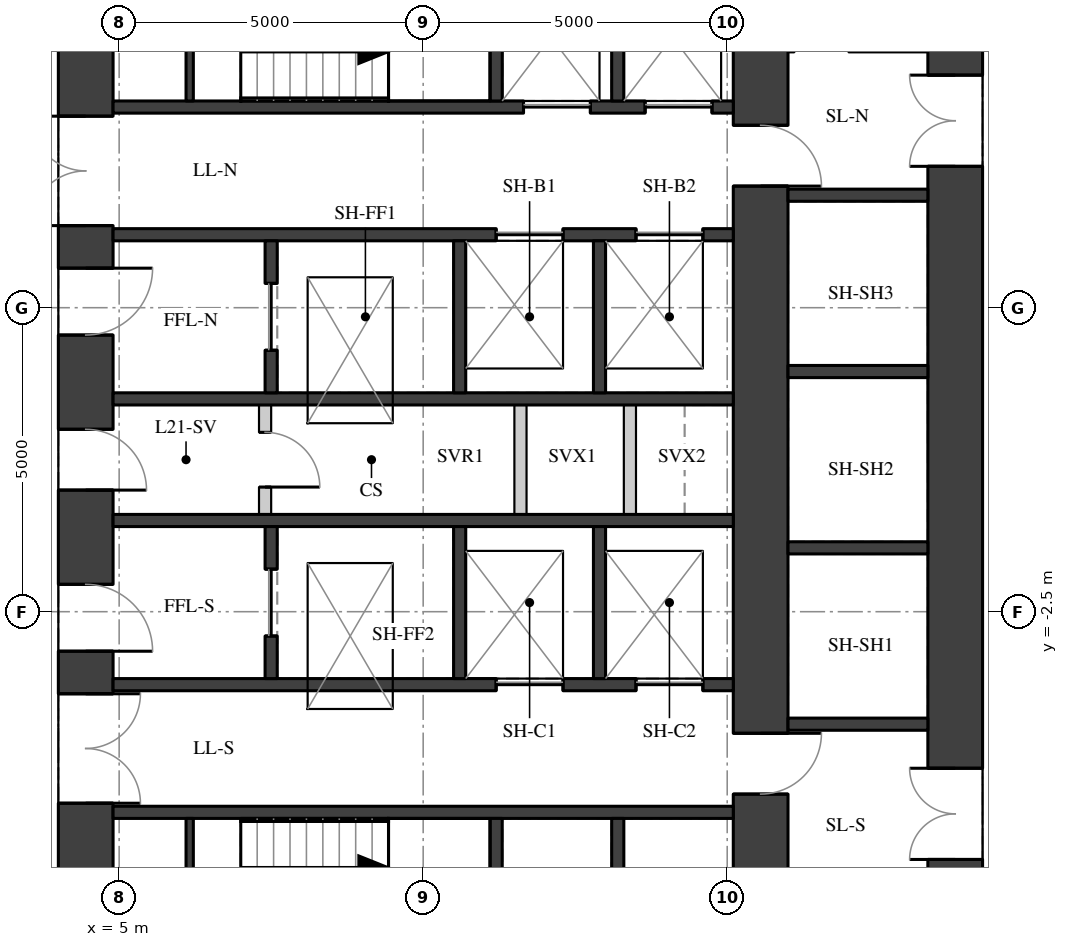
"""IFC4 building model, lengths in metres.
Left out: names, types, materials, properties, quantities, classifications, styles, units other than length and angle.
Written with IfcOpenShell. Run it as: python <this file> out.ifc"""

import sys

from ifc_helpers import new_model, si_unit, direction, frame, frame_2d, origin, place, context, subcontext, project, spatial, rectangle, extrude, element, fill, save


model = new_model("IFC4")
c1 = context("Model", 3, precision=1e-05, world=origin(), true_north=direction((0.0, 1.0)))
c2 = subcontext(c1, "Body", "Model", "MODEL_VIEW")
j1 = project(units=[si_unit("LENGTHUNIT", "METRE"), si_unit("PLANEANGLEUNIT", "RADIAN")], contexts=[c1])
p1 = place(None, origin())
s1 = spatial("IfcSite", under=j1, at=p1, CompositionType="ELEMENT")
p2 = place(p1, origin())
s2 = spatial("IfcBuilding", under=s1, at=p2, CompositionType="ELEMENT")
p3 = place(p2, frame((0.0, 0.0, 77.8)))
s3 = spatial("IfcBuildingStorey", under=s2, at=p3, CompositionType="ELEMENT", Elevation=77.8)
p4 = place(p3, frame((4.45, -11.1, 0.0), z_axis=(0.0, 0.0, 1.0), x_axis=(0.0, 1.0, 0.0)))
e1 = element("IfcWall", 1, at=p4, inside=s3, PredefinedType="SHEAR", context=c2, shape_type="SweptSolid", body=[
    extrude(rectangle(XDim=22.2, YDim=0.9, at=frame_2d((11.1, 0.0))), origin(), (0.0, 0.0, 1.0), 3.02),
])
p5 = place(p4, frame((2.35, 0.0, 0.0)))
e2 = element("IfcOpeningElement", 2, at=p5, cuts=e1, PredefinedType="OPENING", context=c2, shape_type="SweptSolid", body=[
    extrude(rectangle(XDim=1.5, YDim=2.1, at=frame_2d((0.75, 1.05))), frame((0.0, 0.46, 0.0), z_axis=(0.0, -1.0, 0.0), x_axis=(1.0, 0.0, 0.0)), (0.0, 0.0, 1.0), 0.92),
])
p6 = place(p4, frame((5.45, 0.0, 0.0)))
e3 = element("IfcOpeningElement", 3, at=p6, cuts=e1, PredefinedType="OPENING", context=c2, shape_type="SweptSolid", body=[
    extrude(rectangle(XDim=1.8, YDim=2.1, at=frame_2d((0.9, 1.05))), frame((0.0, 0.46, 0.0), z_axis=(0.0, -1.0, 0.0), x_axis=(1.0, 0.0, 0.0)), (0.0, 0.0, 1.0), 0.92),
])
p7 = place(p4, frame((7.95, 0.0, 0.0)))
e4 = element("IfcOpeningElement", 4, at=p7, cuts=e1, PredefinedType="OPENING", context=c2, shape_type="SweptSolid", body=[
    extrude(rectangle(XDim=1.1, YDim=2.1, at=frame_2d((0.55, 1.05))), frame((0.0, 0.46, 0.0), z_axis=(0.0, -1.0, 0.0), x_axis=(1.0, 0.0, 0.0)), (0.0, 0.0, 1.0), 0.92),
])
p8 = place(p4, frame((10.6, 0.0, 0.0)))
e5 = element("IfcOpeningElement", 5, at=p8, cuts=e1, PredefinedType="OPENING", context=c2, shape_type="SweptSolid", body=[
    extrude(rectangle(XDim=1.0, YDim=2.1, at=frame_2d((0.5, 1.05))), frame((0.0, 0.46, 0.0), z_axis=(0.0, -1.0, 0.0), x_axis=(1.0, 0.0, 0.0)), (0.0, 0.0, 1.0), 0.92),
])
p9 = place(p4, frame((13.15, 0.0, 0.0)))
e6 = element("IfcOpeningElement", 6, at=p9, cuts=e1, PredefinedType="OPENING", context=c2, shape_type="SweptSolid", body=[
    extrude(rectangle(XDim=1.1, YDim=2.1, at=frame_2d((0.55, 1.05))), frame((0.0, 0.46, 0.0), z_axis=(0.0, -1.0, 0.0), x_axis=(1.0, 0.0, 0.0)), (0.0, 0.0, 1.0), 0.92),
])
p10 = place(p4, frame((14.95, 0.0, 0.0)))
e7 = element("IfcOpeningElement", 7, at=p10, cuts=e1, PredefinedType="OPENING", context=c2, shape_type="SweptSolid", body=[
    extrude(rectangle(XDim=1.8, YDim=2.1, at=frame_2d((0.9, 1.05))), frame((0.0, 0.46, 0.0), z_axis=(0.0, -1.0, 0.0), x_axis=(1.0, 0.0, 0.0)), (0.0, 0.0, 1.0), 0.92),
])
p11 = place(p4, frame((18.35, 0.0, 0.0)))
e8 = element("IfcOpeningElement", 8, at=p11, cuts=e1, PredefinedType="OPENING", context=c2, shape_type="SweptSolid", body=[
    extrude(rectangle(XDim=1.5, YDim=2.1, at=frame_2d((0.75, 1.05))), frame((0.0, 0.46, 0.0), z_axis=(0.0, -1.0, 0.0), x_axis=(1.0, 0.0, 0.0)), (0.0, 0.0, 1.0), 0.92),
])
p12 = place(p3, frame((18.75, -11.1, 0.0), z_axis=(0.0, 0.0, 1.0), x_axis=(0.0, 1.0, 0.0)))
e9 = element("IfcWall", 9, at=p12, inside=s3, PredefinedType="SHEAR", context=c2, shape_type="SweptSolid", body=[
    extrude(rectangle(XDim=22.2, YDim=0.9, at=frame_2d((11.1, 0.0))), origin(), (0.0, 0.0, 1.0), 3.02),
])
p13 = place(p12, frame((15.925, 0.0, 0.0)))
e10 = element("IfcOpeningElement", 10, at=p13, cuts=e9, PredefinedType="OPENING", context=c2, shape_type="SweptSolid", body=[
    extrude(rectangle(XDim=1.5, YDim=2.1, at=frame_2d((0.75, 1.05))), frame((0.0, 0.46, 0.0), z_axis=(0.0, -1.0, 0.0), x_axis=(1.0, 0.0, 0.0)), (0.0, 0.0, 1.0), 0.92),
])
p14 = place(p12, frame((4.525, 0.0, 0.0)))
e11 = element("IfcOpeningElement", 11, at=p14, cuts=e9, PredefinedType="OPENING", context=c2, shape_type="SweptSolid", body=[
    extrude(rectangle(XDim=1.5, YDim=2.1, at=frame_2d((0.75, 1.05))), frame((0.0, 0.46, 0.0), z_axis=(0.0, -1.0, 0.0), x_axis=(1.0, 0.0, 0.0)), (0.0, 0.0, 1.0), 0.92),
])
p15 = place(p3, frame((15.55, -11.1, 0.0), z_axis=(0.0, 0.0, 1.0), x_axis=(0.0, 1.0, 0.0)))
e12 = element("IfcWall", 12, at=p15, inside=s3, PredefinedType="SHEAR", context=c2, shape_type="SweptSolid", body=[
    extrude(rectangle(XDim=22.2, YDim=0.9, at=frame_2d((11.1, 0.0))), origin(), (0.0, 0.0, 1.0), 3.02),
])
p16 = place(p15, frame((15.6, 0.0, 0.0)))
e13 = element("IfcOpeningElement", 13, at=p16, cuts=e12, PredefinedType="OPENING", context=c2, shape_type="SweptSolid", body=[
    extrude(rectangle(XDim=1.0, YDim=2.1, at=frame_2d((0.5, 1.05))), frame((0.0, 0.46, 0.0), z_axis=(0.0, -1.0, 0.0), x_axis=(1.0, 0.0, 0.0)), (0.0, 0.0, 1.0), 0.92),
])
p17 = place(p15, frame((5.6, 0.0, 0.0)))
e14 = element("IfcOpeningElement", 14, at=p17, cuts=e12, PredefinedType="OPENING", context=c2, shape_type="SweptSolid", body=[
    extrude(rectangle(XDim=1.0, YDim=2.1, at=frame_2d((0.5, 1.05))), frame((0.0, 0.46, 0.0), z_axis=(0.0, -1.0, 0.0), x_axis=(1.0, 0.0, 0.0)), (0.0, 0.0, 1.0), 0.92),
])
p18 = place(p3, frame((4.9, 5.8, 0.0), z_axis=(0.0, 0.0, 1.0), x_axis=(1.0, 0.0, 0.0)))
e15 = element("IfcWall", 15, at=p18, inside=s3, PredefinedType="SHEAR", context=c2, shape_type="SweptSolid", body=[
    extrude(rectangle(XDim=10.2, YDim=0.2, at=frame_2d((5.1, 0.0))), origin(), (0.0, 0.0, 1.0), 3.02),
])
p19 = place(p18, frame((6.75, 0.0, 0.0)))
e16 = element("IfcOpeningElement", 16, at=p19, cuts=e15, PredefinedType="OPENING", context=c2, shape_type="SweptSolid", body=[
    extrude(rectangle(XDim=1.1, YDim=2.1, at=frame_2d((0.55, 1.05))), frame((0.0, 0.11, 0.0), z_axis=(0.0, -1.0, 0.0), x_axis=(1.0, 0.0, 0.0)), (0.0, 0.0, 1.0), 0.22),
])
p20 = place(p18, frame((8.75, 0.0, 0.0)))
e17 = element("IfcOpeningElement", 17, at=p20, cuts=e15, PredefinedType="OPENING", context=c2, shape_type="SweptSolid", body=[
    extrude(rectangle(XDim=1.1, YDim=2.1, at=frame_2d((0.55, 1.05))), frame((0.0, 0.11, 0.0), z_axis=(0.0, -1.0, 0.0), x_axis=(1.0, 0.0, 0.0)), (0.0, 0.0, 1.0), 0.22),
])
p21 = place(p3, frame((4.9, 3.7, 0.0), z_axis=(0.0, 0.0, 1.0), x_axis=(1.0, 0.0, 0.0)))
e18 = element("IfcWall", 18, at=p21, inside=s3, PredefinedType="SHEAR", context=c2, shape_type="SweptSolid", body=[
    extrude(rectangle(XDim=10.2, YDim=0.2, at=frame_2d((5.1, 0.0))), origin(), (0.0, 0.0, 1.0), 3.02),
])
p22 = place(p21, frame((6.3, 0.0, 0.0)))
e19 = element("IfcOpeningElement", 19, at=p22, cuts=e18, PredefinedType="OPENING", context=c2, shape_type="SweptSolid", body=[
    extrude(rectangle(XDim=1.1, YDim=2.1, at=frame_2d((0.55, 1.05))), frame((0.0, 0.11, 0.0), z_axis=(0.0, -1.0, 0.0), x_axis=(1.0, 0.0, 0.0)), (0.0, 0.0, 1.0), 0.22),
])
p23 = place(p21, frame((8.6, 0.0, 0.0)))
e20 = element("IfcOpeningElement", 20, at=p23, cuts=e18, PredefinedType="OPENING", context=c2, shape_type="SweptSolid", body=[
    extrude(rectangle(XDim=1.1, YDim=2.1, at=frame_2d((0.55, 1.05))), frame((0.0, 0.11, 0.0), z_axis=(0.0, -1.0, 0.0), x_axis=(1.0, 0.0, 0.0)), (0.0, 0.0, 1.0), 0.22),
])
for number, where, z_axis, x_axis in (
    (21, (4.9, 1.0, 0.0), (0.0, 0.0, 1.0), (1.0, 0.0, 0.0)),
    (22, (4.9, -1.0, 0.0), (0.0, 0.0, 1.0), (1.0, 0.0, 0.0)),
):
    element("IfcWall", number, at=place(p3, frame(where, z_axis=z_axis, x_axis=x_axis)), inside=s3, PredefinedType="SHEAR", context=c2, shape_type="SweptSolid", body=[
        extrude(rectangle(XDim=10.2, YDim=0.2, at=frame_2d((5.1, 0.0))), origin(), (0.0, 0.0, 1.0), 3.02),
    ])
p24 = place(p3, frame((4.9, -3.7, 0.0), z_axis=(0.0, 0.0, 1.0), x_axis=(1.0, 0.0, 0.0)))
e23 = element("IfcWall", 23, at=p24, inside=s3, PredefinedType="SHEAR", context=c2, shape_type="SweptSolid", body=[
    extrude(rectangle(XDim=10.2, YDim=0.2, at=frame_2d((5.1, 0.0))), origin(), (0.0, 0.0, 1.0), 3.02),
])
p25 = place(p24, frame((6.3, 0.0, 0.0)))
e24 = element("IfcOpeningElement", 24, at=p25, cuts=e23, PredefinedType="OPENING", context=c2, shape_type="SweptSolid", body=[
    extrude(rectangle(XDim=1.1, YDim=2.1, at=frame_2d((0.55, 1.05))), frame((0.0, 0.11, 0.0), z_axis=(0.0, -1.0, 0.0), x_axis=(1.0, 0.0, 0.0)), (0.0, 0.0, 1.0), 0.22),
])
p26 = place(p24, frame((8.6, 0.0, 0.0)))
e25 = element("IfcOpeningElement", 25, at=p26, cuts=e23, PredefinedType="OPENING", context=c2, shape_type="SweptSolid", body=[
    extrude(rectangle(XDim=1.1, YDim=2.1, at=frame_2d((0.55, 1.05))), frame((0.0, 0.11, 0.0), z_axis=(0.0, -1.0, 0.0), x_axis=(1.0, 0.0, 0.0)), (0.0, 0.0, 1.0), 0.22),
])
p27 = place(p3, frame((4.9, -5.8, 0.0), z_axis=(0.0, 0.0, 1.0), x_axis=(1.0, 0.0, 0.0)))
e26 = element("IfcWall", 26, at=p27, inside=s3, PredefinedType="SHEAR", context=c2, shape_type="SweptSolid", body=[
    extrude(rectangle(XDim=10.2, YDim=0.2, at=frame_2d((5.1, 0.0))), origin(), (0.0, 0.0, 1.0), 3.02),
])
for number, where, z_axis, x_axis in (
    (27, (11.2, 5.9, 0.0), (0.0, 0.0, 1.0), (0.0, 1.0, 0.0)),
    (28, (11.2, -9.1, 0.0), (0.0, 0.0, 1.0), (0.0, 1.0, 0.0)),
    (29, (13.2, 5.9, 0.0), (0.0, 0.0, 1.0), (0.0, 1.0, 0.0)),
    (30, (13.2, -9.1, 0.0), (0.0, 0.0, 1.0), (0.0, 1.0, 0.0)),
):
    element("IfcWall", number, at=place(p3, frame(where, z_axis=z_axis, x_axis=x_axis)), inside=s3, PredefinedType="SHEAR", context=c2, shape_type="SweptSolid", body=[
        extrude(rectangle(XDim=3.2, YDim=0.2, at=frame_2d((1.6, 0.0))), origin(), (0.0, 0.0, 1.0), 3.02),
    ])
p28 = place(p3, frame((7.5, 1.1, 0.0), z_axis=(0.0, 0.0, 1.0), x_axis=(0.0, 1.0, 0.0)))
e31 = element("IfcWall", 31, at=p28, inside=s3, PredefinedType="SHEAR", context=c2, shape_type="SweptSolid", body=[
    extrude(rectangle(XDim=2.5, YDim=0.2, at=frame_2d((1.25, 0.0))), origin(), (0.0, 0.0, 1.0), 3.02),
])
p29 = place(p28, frame((0.7, 0.0, 0.0)))
e32 = element("IfcOpeningElement", 32, at=p29, cuts=e31, PredefinedType="OPENING", context=c2, shape_type="SweptSolid", body=[
    extrude(rectangle(XDim=1.1, YDim=2.1, at=frame_2d((0.55, 1.05))), frame((0.0, 0.11, 0.0), z_axis=(0.0, -1.0, 0.0), x_axis=(1.0, 0.0, 0.0)), (0.0, 0.0, 1.0), 0.22),
])
p30 = place(p3, frame((7.5, -3.6, 0.0), z_axis=(0.0, 0.0, 1.0), x_axis=(0.0, 1.0, 0.0)))
e33 = element("IfcWall", 33, at=p30, inside=s3, PredefinedType="SHEAR", context=c2, shape_type="SweptSolid", body=[
    extrude(rectangle(XDim=2.5, YDim=0.2, at=frame_2d((1.25, 0.0))), origin(), (0.0, 0.0, 1.0), 3.02),
])
p31 = place(p30, frame((0.7, 0.0, 0.0)))
e34 = element("IfcOpeningElement", 34, at=p31, cuts=e33, PredefinedType="OPENING", context=c2, shape_type="SweptSolid", body=[
    extrude(rectangle(XDim=1.1, YDim=2.1, at=frame_2d((0.55, 1.05))), frame((0.0, 0.11, 0.0), z_axis=(0.0, -1.0, 0.0), x_axis=(1.0, 0.0, 0.0)), (0.0, 0.0, 1.0), 0.22),
])
for number, where, z_axis, x_axis in (
    (35, (10.6, 1.1, 0.0), (0.0, 0.0, 1.0), (0.0, 1.0, 0.0)),
    (36, (10.6, -3.6, 0.0), (0.0, 0.0, 1.0), (0.0, 1.0, 0.0)),
    (37, (12.9, 1.1, 0.0), (0.0, 0.0, 1.0), (0.0, 1.0, 0.0)),
    (38, (12.9, -3.6, 0.0), (0.0, 0.0, 1.0), (0.0, 1.0, 0.0)),
):
    element("IfcWall", number, at=place(p3, frame(where, z_axis=z_axis, x_axis=x_axis)), inside=s3, PredefinedType="SHEAR", context=c2, shape_type="SweptSolid", body=[
        extrude(rectangle(XDim=2.5, YDim=0.2, at=frame_2d((1.25, 0.0))), origin(), (0.0, 0.0, 1.0), 3.02),
    ])
p32 = place(p3, frame((6.16, 5.9, 0.0), z_axis=(0.0, 0.0, 1.0), x_axis=(0.0, 1.0, 0.0)))
e39 = element("IfcWall", 39, at=p32, inside=s3, PredefinedType="SHEAR", context=c2, shape_type="SweptSolid", body=[
    extrude(rectangle(XDim=3.2, YDim=0.12, at=frame_2d((1.6, 0.0))), origin(), (0.0, 0.0, 1.0), 3.02),
])
p33 = place(p32, frame((0.85, 0.0, 0.0)))
e40 = element("IfcOpeningElement", 40, at=p33, cuts=e39, PredefinedType="OPENING", context=c2, shape_type="SweptSolid", body=[
    extrude(rectangle(XDim=1.5, YDim=2.1, at=frame_2d((0.75, 1.05))), frame((0.0, 0.07, 0.0), z_axis=(0.0, -1.0, 0.0), x_axis=(1.0, 0.0, 0.0)), (0.0, 0.0, 1.0), 0.14),
])
p34 = place(p3, frame((6.16, -9.1, 0.0), z_axis=(0.0, 0.0, 1.0), x_axis=(0.0, 1.0, 0.0)))
e41 = element("IfcWall", 41, at=p34, inside=s3, PredefinedType="SHEAR", context=c2, shape_type="SweptSolid", body=[
    extrude(rectangle(XDim=3.2, YDim=0.12, at=frame_2d((1.6, 0.0))), origin(), (0.0, 0.0, 1.0), 3.02),
])
p35 = place(p34, frame((0.85, 0.0, 0.0)))
e42 = element("IfcOpeningElement", 42, at=p35, cuts=e41, PredefinedType="OPENING", context=c2, shape_type="SweptSolid", body=[
    extrude(rectangle(XDim=1.5, YDim=2.1, at=frame_2d((0.75, 1.05))), frame((0.0, 0.07, 0.0), z_axis=(0.0, -1.0, 0.0), x_axis=(1.0, 0.0, 0.0)), (0.0, 0.0, 1.0), 0.14),
])
p36 = place(p3, frame((7.4, -0.9, 0.0), z_axis=(0.0, 0.0, 1.0), x_axis=(0.0, 1.0, 0.0)))
e43 = element("IfcWall", 43, at=p36, inside=s3, PredefinedType="PARTITIONING", context=c2, shape_type="SweptSolid", body=[
    extrude(rectangle(XDim=1.8, YDim=0.2, at=frame_2d((0.9, 0.0))), origin(), (0.0, 0.0, 1.0), 3.02),
])
p37 = place(p36, frame((0.45, 0.0, 0.0)))
e44 = element("IfcOpeningElement", 44, at=p37, cuts=e43, PredefinedType="OPENING", context=c2, shape_type="SweptSolid", body=[
    extrude(rectangle(XDim=0.9, YDim=2.1, at=frame_2d((0.45, 1.05))), frame((0.0, 0.11, 0.0), z_axis=(0.0, -1.0, 0.0), x_axis=(1.0, 0.0, 0.0)), (0.0, 0.0, 1.0), 0.22),
])
for number, where, z_axis, x_axis in (
    (45, (11.6, -0.9, 0.0), (0.0, 0.0, 1.0), (0.0, 1.0, 0.0)),
    (46, (13.4, -0.9, 0.0), (0.0, 0.0, 1.0), (0.0, 1.0, 0.0)),
):
    element("IfcWall", number, at=place(p3, frame(where, z_axis=z_axis, x_axis=x_axis)), inside=s3, PredefinedType="PARTITIONING", context=c2, shape_type="SweptSolid", body=[
        extrude(rectangle(XDim=1.8, YDim=0.2, at=frame_2d((0.9, 0.0))), origin(), (0.0, 0.0, 1.0), 3.02),
    ])
for number, where, z_axis, x_axis in (
    (47, (16.0, -4.35, 0.0), (0.0, 0.0, 1.0), (1.0, 0.0, 0.0)),
    (48, (16.0, -1.45, 0.0), (0.0, 0.0, 1.0), (1.0, 0.0, 0.0)),
    (49, (16.0, 1.45, 0.0), (0.0, 0.0, 1.0), (1.0, 0.0, 0.0)),
    (50, (16.0, 4.35, 0.0), (0.0, 0.0, 1.0), (1.0, 0.0, 0.0)),
):
    element("IfcWall", number, at=place(p3, frame(where, z_axis=z_axis, x_axis=x_axis)), inside=s3, PredefinedType="SHEAR", context=c2, shape_type="SweptSolid", body=[
        extrude(rectangle(XDim=2.3, YDim=0.2, at=frame_2d((1.15, 0.0))), origin(), (0.0, 0.0, 1.0), 3.02),
    ])
p38 = place(p6, origin())
e51 = element("IfcDoor", 51, at=p38, inside=s3, OperationType="DOUBLE_DOOR_SINGLE_SWING", PredefinedType="DOOR", context=c2, shape_type="SweptSolid", body=[
    extrude(rectangle(XDim=1.8, YDim=2.1, at=frame_2d((0.9, 1.05))), frame((0.0, 0.025, 0.0), z_axis=(0.0, -1.0, 0.0), x_axis=(1.0, 0.0, 0.0)), (0.0, 0.0, 1.0), 0.05),
])
fill(e3, e51)
p39 = place(p7, origin())
e52 = element("IfcDoor", 52, at=p39, inside=s3, OperationType="SINGLE_SWING_RIGHT", PredefinedType="DOOR", context=c2, shape_type="SweptSolid", body=[
    extrude(rectangle(XDim=1.1, YDim=2.1, at=frame_2d((0.55, 1.05))), frame((0.0, 0.025, 0.0), z_axis=(0.0, -1.0, 0.0), x_axis=(1.0, 0.0, 0.0)), (0.0, 0.0, 1.0), 0.05),
])
fill(e4, e52)
p40 = place(p8, origin())
e53 = element("IfcDoor", 53, at=p40, inside=s3, OperationType="SINGLE_SWING_RIGHT", PredefinedType="DOOR", context=c2, shape_type="SweptSolid", body=[
    extrude(rectangle(XDim=1.0, YDim=2.1, at=frame_2d((0.5, 1.05))), frame((0.0, 0.025, 0.0), z_axis=(0.0, -1.0, 0.0), x_axis=(1.0, 0.0, 0.0)), (0.0, 0.0, 1.0), 0.05),
])
fill(e5, e53)
p41 = place(p9, origin())
e54 = element("IfcDoor", 54, at=p41, inside=s3, OperationType="SINGLE_SWING_LEFT", PredefinedType="DOOR", context=c2, shape_type="SweptSolid", body=[
    extrude(rectangle(XDim=1.1, YDim=2.1, at=frame_2d((0.55, 1.05))), frame((0.0, 0.025, 0.0), z_axis=(0.0, -1.0, 0.0), x_axis=(1.0, 0.0, 0.0)), (0.0, 0.0, 1.0), 0.05),
])
fill(e6, e54)
p42 = place(p10, origin())
e55 = element("IfcDoor", 55, at=p42, inside=s3, OperationType="DOUBLE_DOOR_SINGLE_SWING", PredefinedType="DOOR", context=c2, shape_type="SweptSolid", body=[
    extrude(rectangle(XDim=1.8, YDim=2.1, at=frame_2d((0.9, 1.05))), frame((0.0, 0.025, 0.0), z_axis=(0.0, -1.0, 0.0), x_axis=(1.0, 0.0, 0.0)), (0.0, 0.0, 1.0), 0.05),
])
fill(e7, e55)
p43 = place(p13, origin())
e56 = element("IfcDoor", 56, at=p43, inside=s3, OperationType="DOUBLE_DOOR_SINGLE_SWING", PredefinedType="DOOR", context=c2, shape_type="SweptSolid", body=[
    extrude(rectangle(XDim=1.5, YDim=2.1, at=frame_2d((0.75, 1.05))), frame((0.0, 0.025, 0.0), z_axis=(0.0, -1.0, 0.0), x_axis=(1.0, 0.0, 0.0)), (0.0, 0.0, 1.0), 0.05),
])
fill(e10, e56)
p44 = place(p14, origin())
e57 = element("IfcDoor", 57, at=p44, inside=s3, OperationType="DOUBLE_DOOR_SINGLE_SWING", PredefinedType="DOOR", context=c2, shape_type="SweptSolid", body=[
    extrude(rectangle(XDim=1.5, YDim=2.1, at=frame_2d((0.75, 1.05))), frame((0.0, 0.025, 0.0), z_axis=(0.0, -1.0, 0.0), x_axis=(1.0, 0.0, 0.0)), (0.0, 0.0, 1.0), 0.05),
])
fill(e11, e57)
p45 = place(p19, origin())
e58 = element("IfcDoor", 58, at=p45, inside=s3, OperationType="DOUBLE_DOOR_SLIDING", PredefinedType="DOOR", context=c2, shape_type="SweptSolid", body=[
    extrude(rectangle(XDim=1.1, YDim=2.1, at=frame_2d((0.55, 1.05))), frame((0.0, 0.025, 0.0), z_axis=(0.0, -1.0, 0.0), x_axis=(1.0, 0.0, 0.0)), (0.0, 0.0, 1.0), 0.05),
])
fill(e16, e58)
p46 = place(p20, origin())
e59 = element("IfcDoor", 59, at=p46, inside=s3, OperationType="DOUBLE_DOOR_SLIDING", PredefinedType="DOOR", context=c2, shape_type="SweptSolid", body=[
    extrude(rectangle(XDim=1.1, YDim=2.1, at=frame_2d((0.55, 1.05))), frame((0.0, 0.025, 0.0), z_axis=(0.0, -1.0, 0.0), x_axis=(1.0, 0.0, 0.0)), (0.0, 0.0, 1.0), 0.05),
])
fill(e17, e59)
p47 = place(p22, origin())
e60 = element("IfcDoor", 60, at=p47, inside=s3, OperationType="DOUBLE_DOOR_SLIDING", PredefinedType="DOOR", context=c2, shape_type="SweptSolid", body=[
    extrude(rectangle(XDim=1.1, YDim=2.1, at=frame_2d((0.55, 1.05))), frame((0.0, 0.025, 0.0), z_axis=(0.0, -1.0, 0.0), x_axis=(1.0, 0.0, 0.0)), (0.0, 0.0, 1.0), 0.05),
])
fill(e19, e60)
p48 = place(p23, origin())
e61 = element("IfcDoor", 61, at=p48, inside=s3, OperationType="DOUBLE_DOOR_SLIDING", PredefinedType="DOOR", context=c2, shape_type="SweptSolid", body=[
    extrude(rectangle(XDim=1.1, YDim=2.1, at=frame_2d((0.55, 1.05))), frame((0.0, 0.025, 0.0), z_axis=(0.0, -1.0, 0.0), x_axis=(1.0, 0.0, 0.0)), (0.0, 0.0, 1.0), 0.05),
])
fill(e20, e61)
p49 = place(p25, origin())
e62 = element("IfcDoor", 62, at=p49, inside=s3, OperationType="DOUBLE_DOOR_SLIDING", PredefinedType="DOOR", context=c2, shape_type="SweptSolid", body=[
    extrude(rectangle(XDim=1.1, YDim=2.1, at=frame_2d((0.55, 1.05))), frame((0.0, 0.025, 0.0), z_axis=(0.0, -1.0, 0.0), x_axis=(1.0, 0.0, 0.0)), (0.0, 0.0, 1.0), 0.05),
])
fill(e24, e62)
p50 = place(p26, origin())
e63 = element("IfcDoor", 63, at=p50, inside=s3, OperationType="DOUBLE_DOOR_SLIDING", PredefinedType="DOOR", context=c2, shape_type="SweptSolid", body=[
    extrude(rectangle(XDim=1.1, YDim=2.1, at=frame_2d((0.55, 1.05))), frame((0.0, 0.025, 0.0), z_axis=(0.0, -1.0, 0.0), x_axis=(1.0, 0.0, 0.0)), (0.0, 0.0, 1.0), 0.05),
])
fill(e25, e63)
p51 = place(p29, origin())
e64 = element("IfcDoor", 64, at=p51, inside=s3, OperationType="DOUBLE_DOOR_SLIDING", PredefinedType="DOOR", context=c2, shape_type="SweptSolid", body=[
    extrude(rectangle(XDim=1.1, YDim=2.1, at=frame_2d((0.55, 1.05))), frame((0.0, 0.025, 0.0), z_axis=(0.0, -1.0, 0.0), x_axis=(1.0, 0.0, 0.0)), (0.0, 0.0, 1.0), 0.05),
])
fill(e32, e64)
p52 = place(p31, origin())
e65 = element("IfcDoor", 65, at=p52, inside=s3, OperationType="DOUBLE_DOOR_SLIDING", PredefinedType="DOOR", context=c2, shape_type="SweptSolid", body=[
    extrude(rectangle(XDim=1.1, YDim=2.1, at=frame_2d((0.55, 1.05))), frame((0.0, 0.025, 0.0), z_axis=(0.0, -1.0, 0.0), x_axis=(1.0, 0.0, 0.0)), (0.0, 0.0, 1.0), 0.05),
])
fill(e34, e65)
p53 = place(p37, origin())
e66 = element("IfcDoor", 66, at=p53, inside=s3, OperationType="SINGLE_SWING_RIGHT", PredefinedType="DOOR", context=c2, shape_type="SweptSolid", body=[
    extrude(rectangle(XDim=0.9, YDim=2.1, at=frame_2d((0.45, 1.05))), frame((0.0, 0.025, 0.0), z_axis=(0.0, -1.0, 0.0), x_axis=(1.0, 0.0, 0.0)), (0.0, 0.0, 1.0), 0.05),
])
fill(e44, e66)
p54 = place(p16, origin())
e67 = element("IfcDoor", 67, at=p54, inside=s3, OperationType="SINGLE_SWING_RIGHT", PredefinedType="DOOR", context=c2, shape_type="SweptSolid", body=[
    extrude(rectangle(XDim=1.0, YDim=2.1, at=frame_2d((0.5, 1.05))), frame((0.0, 0.025, 0.0), z_axis=(0.0, -1.0, 0.0), x_axis=(1.0, 0.0, 0.0)), (0.0, 0.0, 1.0), 0.05),
])
fill(e13, e67)
p55 = place(p17, origin())
e68 = element("IfcDoor", 68, at=p55, inside=s3, OperationType="SINGLE_SWING_LEFT", PredefinedType="DOOR", context=c2, shape_type="SweptSolid", body=[
    extrude(rectangle(XDim=1.0, YDim=2.1, at=frame_2d((0.5, 1.05))), frame((0.0, 0.025, 0.0), z_axis=(0.0, -1.0, 0.0), x_axis=(1.0, 0.0, 0.0)), (0.0, 0.0, 1.0), 0.05),
])
fill(e14, e68)
save(model, sys.argv[1])
